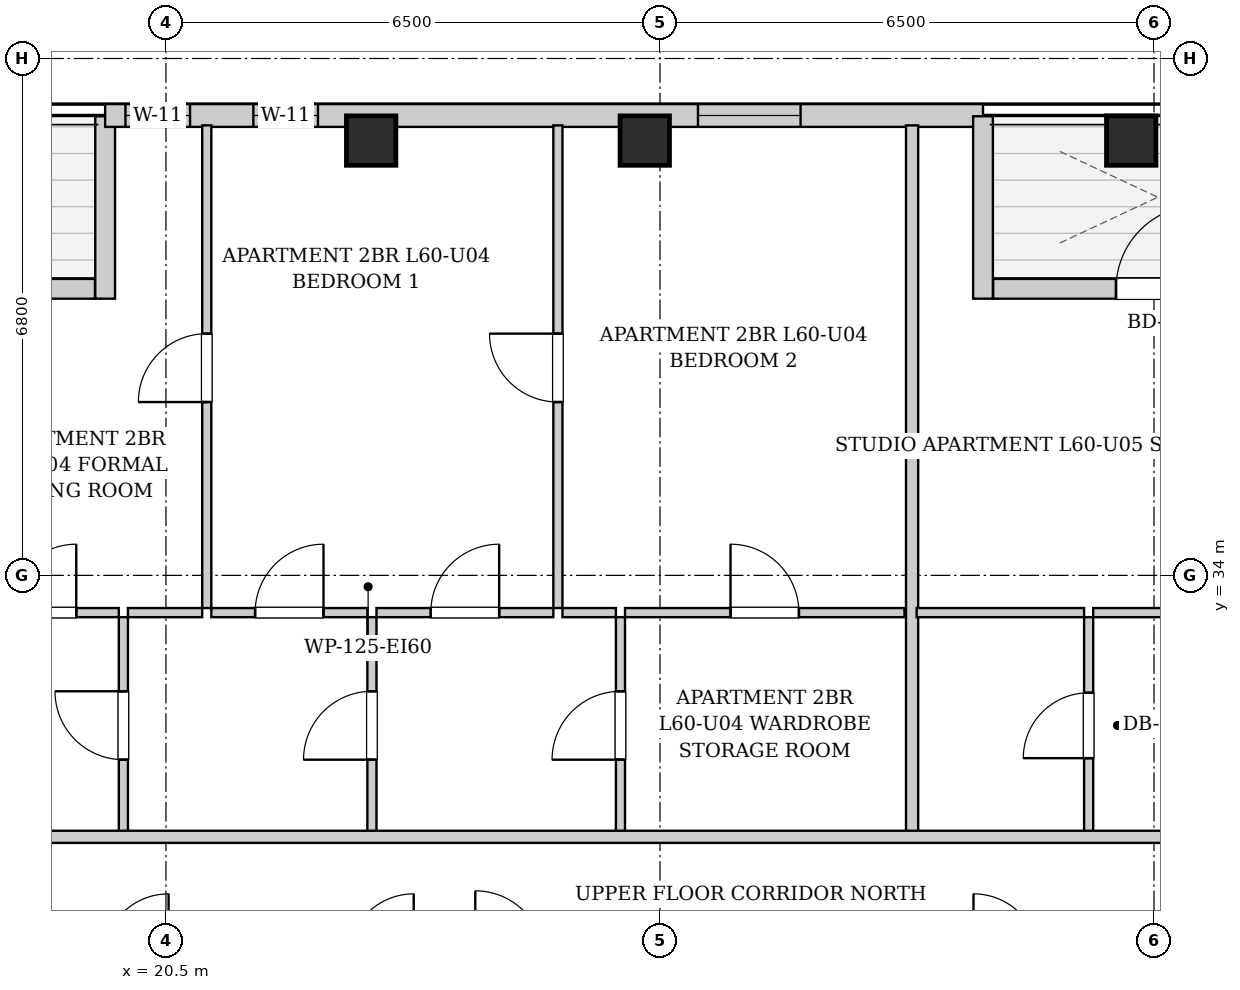
"""IFC4 building model, lengths in metres.
Left out: names, types, materials, properties, quantities, classifications, styles, units other than length and angle.
Written with IfcOpenShell. Run it as: python <this file> out.ifc"""

import sys

from ifc_helpers import new_model, si_unit, direction, frame, frame_2d, origin, origin_2d, place, context, subcontext, project, spatial, rectangle, extrude, element, fill, save


model = new_model("IFC4")
c1 = context("Model", 3, precision=1e-05, world=origin(), true_north=direction((0.0, 1.0)))
c2 = subcontext(c1, "Body", "Model", "MODEL_VIEW")
j1 = project(units=[si_unit("LENGTHUNIT", "METRE"), si_unit("PLANEANGLEUNIT", "RADIAN")], contexts=[c1])
p1 = place(None, origin())
s1 = spatial("IfcSite", under=j1, at=p1, CompositionType="ELEMENT")
p2 = place(p1, origin())
s2 = spatial("IfcBuilding", under=s1, at=p2, CompositionType="ELEMENT")
p3 = place(p2, frame((0.0, 0.0, 207.4)))
s3 = spatial("IfcBuildingStorey", under=s2, at=p3, CompositionType="ELEMENT", Elevation=207.4)
for number, where, z_axis, x_axis in (
    (1, (23.2, 39.72, 0.0), (0.0, 0.0, 1.0), (1.0, 0.0, 0.0)),
    (2, (26.8, 39.72, 0.0), (0.0, 0.0, 1.0), (1.0, 0.0, 0.0)),
    (3, (33.2, 39.72, 0.0), (0.0, 0.0, 1.0), (1.0, 0.0, 0.0)),
):
    element("IfcColumn", number, at=place(p3, frame(where, z_axis=z_axis, x_axis=x_axis)), inside=s3, PredefinedType="COLUMN", context=c2, shape_type="SweptSolid", body=[
        extrude(rectangle(XDim=0.65, YDim=0.65, at=origin_2d()), origin(), (0.0, 0.0, 1.0), 3.3),
    ])
p4 = place(p3, frame((14.534, 37.77, 0.0), z_axis=(0.0, 0.0, 1.0), x_axis=(1.0, 0.0, 0.0)))
e4 = element("IfcWall", 4, at=p4, inside=s3, PredefinedType="SOLIDWALL", context=c2, shape_type="SweptSolid", body=[
    extrude(rectangle(XDim=5.032, YDim=0.26, at=frame_2d((2.516, 0.0))), origin(), (0.0, 0.0, 1.0), 3.04),
])
p5 = place(p4, frame((1.966, 0.0, 0.0)))
e5 = element("IfcOpeningElement", 5, at=p5, cuts=e4, PredefinedType="OPENING", context=c2, shape_type="SweptSolid", body=[
    extrude(rectangle(XDim=1.1, YDim=2.0, at=frame_2d((0.55, 1.0))), frame((0.0, 0.14, 0.0), z_axis=(0.0, -1.0, 0.0), x_axis=(1.0, 0.0, 0.0)), (0.0, 0.0, 1.0), 0.28),
])
p6 = place(p3, frame((19.7, 37.64, 0.0), z_axis=(0.0, 0.0, 1.0), x_axis=(0.0, 1.0, 0.0)))
e6 = element("IfcWall", 6, at=p6, inside=s3, PredefinedType="SOLIDWALL", context=c2, shape_type="SweptSolid", body=[
    extrude(rectangle(XDim=2.4, YDim=0.26, at=frame_2d((1.2, 0.0))), origin(), (0.0, 0.0, 1.0), 3.04),
])
p7 = place(p3, frame((19.7, 40.05, 0.0), z_axis=(0.0, 0.0, 1.0), x_axis=(1.0, 0.0, 0.0)))
e7 = element("IfcWall", 7, at=p7, inside=s3, PredefinedType="SOLIDWALL", context=c2, shape_type="SweptSolid", body=[
    extrude(rectangle(XDim=11.55, YDim=0.3, at=frame_2d((5.775, 0.0))), origin(), (0.0, 0.0, 1.0), 3.04),
])
p8 = place(p7, frame((0.267, 0.0, 0.55)))
e8 = element("IfcOpeningElement", 8, at=p8, cuts=e7, PredefinedType="OPENING", context=c2, shape_type="SweptSolid", body=[
    extrude(rectangle(XDim=0.85, YDim=1.2, at=frame_2d((0.425, 0.6))), frame((0.0, 0.16, 0.0), z_axis=(0.0, -1.0, 0.0), x_axis=(1.0, 0.0, 0.0)), (0.0, 0.0, 1.0), 0.32),
])
p9 = place(p7, frame((1.95, 0.0, 0.55)))
e9 = element("IfcOpeningElement", 9, at=p9, cuts=e7, PredefinedType="OPENING", context=c2, shape_type="SweptSolid", body=[
    extrude(rectangle(XDim=0.85, YDim=1.2, at=frame_2d((0.425, 0.6))), frame((0.0, 0.16, 0.0), z_axis=(0.0, -1.0, 0.0), x_axis=(1.0, 0.0, 0.0)), (0.0, 0.0, 1.0), 0.32),
])
p10 = place(p7, frame((7.8, 0.0, 0.55)))
e10 = element("IfcOpeningElement", 10, at=p10, cuts=e7, PredefinedType="OPENING", context=c2, shape_type="SweptSolid", body=[
    extrude(rectangle(XDim=1.35, YDim=1.2, at=frame_2d((0.675, 0.6))), frame((0.0, 0.16, 0.0), z_axis=(0.0, -1.0, 0.0), x_axis=(1.0, 0.0, 0.0)), (0.0, 0.0, 1.0), 0.32),
])
p11 = place(p3, frame((31.25, 40.04, 0.0), z_axis=(0.0, 0.0, 1.0), x_axis=(0.0, -1.0, 0.0)))
e11 = element("IfcWall", 11, at=p11, inside=s3, PredefinedType="SOLIDWALL", context=c2, shape_type="SweptSolid", body=[
    extrude(rectangle(XDim=2.4, YDim=0.26, at=frame_2d((1.2, 0.0))), origin(), (0.0, 0.0, 1.0), 3.04),
])
p12 = place(p3, frame((31.384, 37.77, 0.0), z_axis=(0.0, 0.0, 1.0), x_axis=(1.0, 0.0, 0.0)))
e12 = element("IfcWall", 12, at=p12, inside=s3, PredefinedType="SOLIDWALL", context=c2, shape_type="SweptSolid", body=[
    extrude(rectangle(XDim=4.332, YDim=0.26, at=frame_2d((2.166, 0.0))), origin(), (0.0, 0.0, 1.0), 3.04),
])
p13 = place(p12, frame((1.616, 0.0, 0.0)))
e13 = element("IfcOpeningElement", 13, at=p13, cuts=e12, PredefinedType="OPENING", context=c2, shape_type="SweptSolid", body=[
    extrude(rectangle(XDim=1.1, YDim=2.0, at=frame_2d((0.55, 1.0))), frame((0.0, 0.14, 0.0), z_axis=(0.0, -1.0, 0.0), x_axis=(1.0, 0.0, 0.0)), (0.0, 0.0, 1.0), 0.28),
])
p14 = place(p3, frame((19.94, 30.6, 0.0), z_axis=(0.0, 0.0, 1.0), x_axis=(0.0, 1.0, 0.0)))
e14 = element("IfcWall", 14, at=p14, inside=s3, PredefinedType="PARTITIONING", context=c2, shape_type="SweptSolid", body=[
    extrude(rectangle(XDim=2.85, YDim=0.12, at=frame_2d((1.425, 0.0))), origin(), (0.0, 0.0, 1.0), 3.04),
])
p15 = place(p14, frame((0.975, 0.0, 0.0)))
e15 = element("IfcOpeningElement", 15, at=p15, cuts=e14, PredefinedType="OPENING", context=c2, shape_type="SweptSolid", body=[
    extrude(rectangle(XDim=0.9, YDim=2.05, at=frame_2d((0.45, 1.025))), frame((0.0, 0.07, 0.0), z_axis=(0.0, -1.0, 0.0), x_axis=(1.0, 0.0, 0.0)), (0.0, 0.0, 1.0), 0.14),
])
p16 = place(p3, frame((17.86, 33.51, 0.0), z_axis=(0.0, 0.0, 1.0), x_axis=(1.0, 0.0, 0.0)))
e16 = element("IfcWall", 16, at=p16, inside=s3, PredefinedType="PARTITIONING", context=c2, shape_type="SweptSolid", body=[
    extrude(rectangle(XDim=2.02, YDim=0.12, at=frame_2d((1.01, 0.0))), origin(), (0.0, 0.0, 1.0), 3.04),
])
p17 = place(p16, frame((0.56, 0.0, 0.0)))
e17 = element("IfcOpeningElement", 17, at=p17, cuts=e16, PredefinedType="OPENING", context=c2, shape_type="SweptSolid", body=[
    extrude(rectangle(XDim=0.9, YDim=2.05, at=frame_2d((0.45, 1.025))), frame((0.0, 0.07, 0.0), z_axis=(0.0, -1.0, 0.0), x_axis=(1.0, 0.0, 0.0)), (0.0, 0.0, 1.0), 0.14),
])
p18 = place(p3, frame((23.21, 30.6, 0.0), z_axis=(0.0, 0.0, 1.0), x_axis=(0.0, 1.0, 0.0)))
e18 = element("IfcWall", 18, at=p18, inside=s3, PredefinedType="PARTITIONING", context=c2, shape_type="SweptSolid", body=[
    extrude(rectangle(XDim=2.85, YDim=0.12, at=frame_2d((1.425, 0.0))), origin(), (0.0, 0.0, 1.0), 3.04),
])
p19 = place(p18, frame((0.975, 0.0, 0.0)))
e19 = element("IfcOpeningElement", 19, at=p19, cuts=e18, PredefinedType="OPENING", context=c2, shape_type="SweptSolid", body=[
    extrude(rectangle(XDim=0.9, YDim=2.05, at=frame_2d((0.45, 1.025))), frame((0.0, 0.07, 0.0), z_axis=(0.0, -1.0, 0.0), x_axis=(1.0, 0.0, 0.0)), (0.0, 0.0, 1.0), 0.14),
])
p20 = place(p3, frame((20.0, 33.51, 0.0), z_axis=(0.0, 0.0, 1.0), x_axis=(1.0, 0.0, 0.0)))
e20 = element("IfcWall", 20, at=p20, inside=s3, PredefinedType="PARTITIONING", context=c2, shape_type="SweptSolid", body=[
    extrude(rectangle(XDim=0.977, YDim=0.12, at=frame_2d((0.489, 0.0))), origin(), (0.0, 0.0, 1.0), 3.04),
])
p21 = place(p3, frame((21.097, 33.51, 0.0), z_axis=(0.0, 0.0, 1.0), x_axis=(1.0, 0.0, 0.0)))
e21 = element("IfcWall", 21, at=p21, inside=s3, PredefinedType="PARTITIONING", context=c2, shape_type="SweptSolid", body=[
    extrude(rectangle(XDim=2.053, YDim=0.12, at=frame_2d((1.026, 0.0))), origin(), (0.0, 0.0, 1.0), 3.04),
])
p22 = place(p21, frame((0.576, 0.0, 0.0)))
e22 = element("IfcOpeningElement", 22, at=p22, cuts=e21, PredefinedType="OPENING", context=c2, shape_type="SweptSolid", body=[
    extrude(rectangle(XDim=0.9, YDim=2.05, at=frame_2d((0.45, 1.025))), frame((0.0, 0.07, 0.0), z_axis=(0.0, -1.0, 0.0), x_axis=(1.0, 0.0, 0.0)), (0.0, 0.0, 1.0), 0.14),
])
p23 = place(p3, frame((26.48, 30.6, 0.0), z_axis=(0.0, 0.0, 1.0), x_axis=(0.0, 1.0, 0.0)))
e23 = element("IfcWall", 23, at=p23, inside=s3, PredefinedType="PARTITIONING", context=c2, shape_type="SweptSolid", body=[
    extrude(rectangle(XDim=2.85, YDim=0.12, at=frame_2d((1.425, 0.0))), origin(), (0.0, 0.0, 1.0), 3.04),
])
p24 = place(p23, frame((0.975, 0.0, 0.0)))
e24 = element("IfcOpeningElement", 24, at=p24, cuts=e23, PredefinedType="OPENING", context=c2, shape_type="SweptSolid", body=[
    extrude(rectangle(XDim=0.9, YDim=2.05, at=frame_2d((0.45, 1.025))), frame((0.0, 0.07, 0.0), z_axis=(0.0, -1.0, 0.0), x_axis=(1.0, 0.0, 0.0)), (0.0, 0.0, 1.0), 0.14),
])
p25 = place(p3, frame((23.27, 33.51, 0.0), z_axis=(0.0, 0.0, 1.0), x_axis=(1.0, 0.0, 0.0)))
e25 = element("IfcWall", 25, at=p25, inside=s3, PredefinedType="PARTITIONING", context=c2, shape_type="SweptSolid", body=[
    extrude(rectangle(XDim=2.327, YDim=0.12, at=frame_2d((1.164, 0.0))), origin(), (0.0, 0.0, 1.0), 3.04),
])
p26 = place(p25, frame((0.714, 0.0, 0.0)))
e26 = element("IfcOpeningElement", 26, at=p26, cuts=e25, PredefinedType="OPENING", context=c2, shape_type="SweptSolid", body=[
    extrude(rectangle(XDim=0.9, YDim=2.05, at=frame_2d((0.45, 1.025))), frame((0.0, 0.07, 0.0), z_axis=(0.0, -1.0, 0.0), x_axis=(1.0, 0.0, 0.0)), (0.0, 0.0, 1.0), 0.14),
])
p27 = place(p3, frame((25.717, 33.51, 0.0), z_axis=(0.0, 0.0, 1.0), x_axis=(1.0, 0.0, 0.0)))
e27 = element("IfcWall", 27, at=p27, inside=s3, PredefinedType="PARTITIONING", context=c2, shape_type="SweptSolid", body=[
    extrude(rectangle(XDim=0.703, YDim=0.12, at=frame_2d((0.352, 0.0))), origin(), (0.0, 0.0, 1.0), 3.04),
])
p28 = place(p3, frame((26.54, 33.51, 0.0), z_axis=(0.0, 0.0, 1.0), x_axis=(1.0, 0.0, 0.0)))
e28 = element("IfcWall", 28, at=p28, inside=s3, PredefinedType="PARTITIONING", context=c2, shape_type="SweptSolid", body=[
    extrude(rectangle(XDim=3.677, YDim=0.12, at=frame_2d((1.838, 0.0))), origin(), (0.0, 0.0, 1.0), 3.04),
])
p29 = place(p28, frame((1.388, 0.0, 0.0)))
e29 = element("IfcOpeningElement", 29, at=p29, cuts=e28, PredefinedType="OPENING", context=c2, shape_type="SweptSolid", body=[
    extrude(rectangle(XDim=0.9, YDim=2.05, at=frame_2d((0.45, 1.025))), frame((0.0, 0.07, 0.0), z_axis=(0.0, -1.0, 0.0), x_axis=(1.0, 0.0, 0.0)), (0.0, 0.0, 1.0), 0.14),
])
p30 = place(p3, frame((21.037, 33.57, 0.0), z_axis=(0.0, 0.0, 1.0), x_axis=(0.0, 1.0, 0.0)))
e30 = element("IfcWall", 30, at=p30, inside=s3, PredefinedType="PARTITIONING", context=c2, shape_type="SweptSolid", body=[
    extrude(rectangle(XDim=6.35, YDim=0.12, at=frame_2d((3.175, 0.0))), origin(), (0.0, 0.0, 1.0), 3.04),
])
p31 = place(p30, frame((2.71, 0.0, 0.0)))
e31 = element("IfcOpeningElement", 31, at=p31, cuts=e30, PredefinedType="OPENING", context=c2, shape_type="SweptSolid", body=[
    extrude(rectangle(XDim=0.9, YDim=2.05, at=frame_2d((0.45, 1.025))), frame((0.0, 0.07, 0.0), z_axis=(0.0, -1.0, 0.0), x_axis=(1.0, 0.0, 0.0)), (0.0, 0.0, 1.0), 0.14),
])
p32 = place(p3, frame((25.657, 33.57, 0.0), z_axis=(0.0, 0.0, 1.0), x_axis=(0.0, 1.0, 0.0)))
e32 = element("IfcWall", 32, at=p32, inside=s3, PredefinedType="PARTITIONING", context=c2, shape_type="SweptSolid", body=[
    extrude(rectangle(XDim=6.35, YDim=0.12, at=frame_2d((3.175, 0.0))), origin(), (0.0, 0.0, 1.0), 3.04),
])
p33 = place(p32, frame((2.71, 0.0, 0.0)))
e33 = element("IfcOpeningElement", 33, at=p33, cuts=e32, PredefinedType="OPENING", context=c2, shape_type="SweptSolid", body=[
    extrude(rectangle(XDim=0.9, YDim=2.05, at=frame_2d((0.45, 1.025))), frame((0.0, 0.07, 0.0), z_axis=(0.0, -1.0, 0.0), x_axis=(1.0, 0.0, 0.0)), (0.0, 0.0, 1.0), 0.14),
])
p34 = place(p3, frame((30.317, 30.6, 0.0), z_axis=(0.0, 0.0, 1.0), x_axis=(0.0, 1.0, 0.0)))
e34 = element("IfcWall", 34, at=p34, inside=s3, PredefinedType="PARTITIONING", context=c2, shape_type="SweptSolid", body=[
    extrude(rectangle(XDim=9.32, YDim=0.16, at=frame_2d((4.66, 0.0))), origin(), (0.0, 0.0, 1.0), 3.04),
])
p35 = place(p3, frame((32.64, 30.6, 0.0), z_axis=(0.0, 0.0, 1.0), x_axis=(0.0, 1.0, 0.0)))
e35 = element("IfcWall", 35, at=p35, inside=s3, PredefinedType="PARTITIONING", context=c2, shape_type="SweptSolid", body=[
    extrude(rectangle(XDim=2.85, YDim=0.12, at=frame_2d((1.425, 0.0))), origin(), (0.0, 0.0, 1.0), 3.04),
])
p36 = place(p35, frame((0.995, 0.0, 0.0)))
e36 = element("IfcOpeningElement", 36, at=p36, cuts=e35, PredefinedType="OPENING", context=c2, shape_type="SweptSolid", body=[
    extrude(rectangle(XDim=0.86, YDim=2.05, at=frame_2d((0.43, 1.025))), frame((0.0, 0.07, 0.0), z_axis=(0.0, -1.0, 0.0), x_axis=(1.0, 0.0, 0.0)), (0.0, 0.0, 1.0), 0.14),
])
p37 = place(p3, frame((30.377, 33.51, 0.0), z_axis=(0.0, 0.0, 1.0), x_axis=(1.0, 0.0, 0.0)))
e37 = element("IfcWall", 37, at=p37, inside=s3, PredefinedType="PARTITIONING", context=c2, shape_type="SweptSolid", body=[
    extrude(rectangle(XDim=2.203, YDim=0.12, at=frame_2d((1.102, 0.0))), origin(), (0.0, 0.0, 1.0), 3.04),
])
p38 = place(p3, frame((32.7, 33.51, 0.0), z_axis=(0.0, 0.0, 1.0), x_axis=(1.0, 0.0, 0.0)))
e38 = element("IfcWall", 38, at=p38, inside=s3, PredefinedType="PARTITIONING", context=c2, shape_type="SweptSolid", body=[
    extrude(rectangle(XDim=5.02, YDim=0.12, at=frame_2d((2.51, 0.0))), origin(), (0.0, 0.0, 1.0), 3.04),
])
p39 = place(p38, frame((2.06, 0.0, 0.0)))
e39 = element("IfcOpeningElement", 39, at=p39, cuts=e38, PredefinedType="OPENING", context=c2, shape_type="SweptSolid", body=[
    extrude(rectangle(XDim=0.9, YDim=2.05, at=frame_2d((0.45, 1.025))), frame((0.0, 0.07, 0.0), z_axis=(0.0, -1.0, 0.0), x_axis=(1.0, 0.0, 0.0)), (0.0, 0.0, 1.0), 0.14),
])
p40 = place(p3, frame((13.15, 30.56, 0.0), z_axis=(0.0, 0.0, 1.0), x_axis=(1.0, 0.0, 0.0)))
e40 = element("IfcWall", 40, at=p40, inside=s3, PredefinedType="PARTITIONING", context=c2, shape_type="SweptSolid", body=[
    extrude(rectangle(XDim=24.6, YDim=0.16, at=frame_2d((12.3, 0.0))), origin(), (0.0, 0.0, 1.0), 3.04),
])
p41 = place(p40, frame((3.115, 0.0, 0.0)))
e41 = element("IfcOpeningElement", 41, at=p41, cuts=e40, PredefinedType="OPENING", context=c2, shape_type="SweptSolid", body=[
    extrude(rectangle(XDim=0.95, YDim=2.1, at=frame_2d((0.475, 1.05))), frame((0.0, 0.09, 0.0), z_axis=(0.0, -1.0, 0.0), x_axis=(1.0, 0.0, 0.0)), (0.0, 0.0, 1.0), 0.18),
])
p42 = place(p40, frame((21.55, 0.0, 0.0)))
e42 = element("IfcOpeningElement", 42, at=p42, cuts=e40, PredefinedType="OPENING", context=c2, shape_type="SweptSolid", body=[
    extrude(rectangle(XDim=0.95, YDim=2.1, at=frame_2d((0.475, 1.05))), frame((0.0, 0.09, 0.0), z_axis=(0.0, -1.0, 0.0), x_axis=(1.0, 0.0, 0.0)), (0.0, 0.0, 1.0), 0.18),
])
p43 = place(p15, origin())
e43 = element("IfcDoor", 43, at=p43, inside=s3, OperationType="SINGLE_SWING_RIGHT", PredefinedType="DOOR", context=c2, shape_type="SweptSolid", body=[
    extrude(rectangle(XDim=0.9, YDim=2.05, at=frame_2d((0.45, 1.025))), frame((0.0, 0.025, 0.0), z_axis=(0.0, -1.0, 0.0), x_axis=(1.0, 0.0, 0.0)), (0.0, 0.0, 1.0), 0.05),
])
fill(e15, e43)
p44 = place(p17, origin())
e44 = element("IfcDoor", 44, at=p44, inside=s3, OperationType="SINGLE_SWING_RIGHT", PredefinedType="DOOR", context=c2, shape_type="SweptSolid", body=[
    extrude(rectangle(XDim=0.9, YDim=2.05, at=frame_2d((0.45, 1.025))), frame((0.0, 0.025, 0.0), z_axis=(0.0, -1.0, 0.0), x_axis=(1.0, 0.0, 0.0)), (0.0, 0.0, 1.0), 0.05),
])
fill(e17, e44)
p45 = place(p19, origin())
e45 = element("IfcDoor", 45, at=p45, inside=s3, OperationType="SINGLE_SWING_LEFT", PredefinedType="DOOR", context=c2, shape_type="SweptSolid", body=[
    extrude(rectangle(XDim=0.9, YDim=2.05, at=frame_2d((0.45, 1.025))), frame((0.0, 0.025, 0.0), z_axis=(0.0, -1.0, 0.0), x_axis=(1.0, 0.0, 0.0)), (0.0, 0.0, 1.0), 0.05),
])
fill(e19, e45)
p46 = place(p22, origin())
e46 = element("IfcDoor", 46, at=p46, inside=s3, OperationType="SINGLE_SWING_RIGHT", PredefinedType="DOOR", context=c2, shape_type="SweptSolid", body=[
    extrude(rectangle(XDim=0.9, YDim=2.05, at=frame_2d((0.45, 1.025))), frame((0.0, 0.025, 0.0), z_axis=(0.0, -1.0, 0.0), x_axis=(1.0, 0.0, 0.0)), (0.0, 0.0, 1.0), 0.05),
])
fill(e22, e46)
p47 = place(p24, origin())
e47 = element("IfcDoor", 47, at=p47, inside=s3, OperationType="SINGLE_SWING_LEFT", PredefinedType="DOOR", context=c2, shape_type="SweptSolid", body=[
    extrude(rectangle(XDim=0.9, YDim=2.05, at=frame_2d((0.45, 1.025))), frame((0.0, 0.025, 0.0), z_axis=(0.0, -1.0, 0.0), x_axis=(1.0, 0.0, 0.0)), (0.0, 0.0, 1.0), 0.05),
])
fill(e24, e47)
p48 = place(p26, origin())
e48 = element("IfcDoor", 48, at=p48, inside=s3, OperationType="SINGLE_SWING_RIGHT", PredefinedType="DOOR", context=c2, shape_type="SweptSolid", body=[
    extrude(rectangle(XDim=0.9, YDim=2.05, at=frame_2d((0.45, 1.025))), frame((0.0, 0.025, 0.0), z_axis=(0.0, -1.0, 0.0), x_axis=(1.0, 0.0, 0.0)), (0.0, 0.0, 1.0), 0.05),
])
fill(e26, e48)
p49 = place(p29, origin())
e49 = element("IfcDoor", 49, at=p49, inside=s3, OperationType="SINGLE_SWING_LEFT", PredefinedType="DOOR", context=c2, shape_type="SweptSolid", body=[
    extrude(rectangle(XDim=0.9, YDim=2.05, at=frame_2d((0.45, 1.025))), frame((0.0, 0.025, 0.0), z_axis=(0.0, -1.0, 0.0), x_axis=(1.0, 0.0, 0.0)), (0.0, 0.0, 1.0), 0.05),
])
fill(e29, e49)
p50 = place(p31, origin())
e50 = element("IfcDoor", 50, at=p50, inside=s3, OperationType="SINGLE_SWING_LEFT", PredefinedType="DOOR", context=c2, shape_type="SweptSolid", body=[
    extrude(rectangle(XDim=0.9, YDim=2.05, at=frame_2d((0.45, 1.025))), frame((0.0, 0.025, 0.0), z_axis=(0.0, -1.0, 0.0), x_axis=(1.0, 0.0, 0.0)), (0.0, 0.0, 1.0), 0.05),
])
fill(e31, e50)
p51 = place(p33, origin())
e51 = element("IfcDoor", 51, at=p51, inside=s3, OperationType="SINGLE_SWING_RIGHT", PredefinedType="DOOR", context=c2, shape_type="SweptSolid", body=[
    extrude(rectangle(XDim=0.9, YDim=2.05, at=frame_2d((0.45, 1.025))), frame((0.0, 0.025, 0.0), z_axis=(0.0, -1.0, 0.0), x_axis=(1.0, 0.0, 0.0)), (0.0, 0.0, 1.0), 0.05),
])
fill(e33, e51)
p52 = place(p36, origin())
e52 = element("IfcDoor", 52, at=p52, inside=s3, OperationType="SINGLE_SWING_LEFT", PredefinedType="DOOR", context=c2, shape_type="SweptSolid", body=[
    extrude(rectangle(XDim=0.86, YDim=2.05, at=frame_2d((0.43, 1.025))), frame((0.0, 0.025, 0.0), z_axis=(0.0, -1.0, 0.0), x_axis=(1.0, 0.0, 0.0)), (0.0, 0.0, 1.0), 0.05),
])
fill(e36, e52)
p53 = place(p13, origin())
e53 = element("IfcDoor", 53, at=p53, inside=s3, OperationType="SINGLE_SWING_RIGHT", PredefinedType="DOOR", context=c2, shape_type="SweptSolid", body=[
    extrude(rectangle(XDim=1.1, YDim=2.0, at=frame_2d((0.55, 1.0))), frame((0.0, 0.025, 0.0), z_axis=(0.0, -1.0, 0.0), x_axis=(1.0, 0.0, 0.0)), (0.0, 0.0, 1.0), 0.05),
])
fill(e13, e53)
p54 = place(p8, origin())
e54 = element("IfcWindow", 54, at=p54, inside=s3, PartitioningType="SINGLE_PANEL", PredefinedType="WINDOW", context=c2, shape_type="SweptSolid", body=[
    extrude(rectangle(XDim=0.85, YDim=1.2, at=frame_2d((0.425, 0.6))), frame((0.0, 0.03, 0.0), z_axis=(0.0, -1.0, 0.0), x_axis=(1.0, 0.0, 0.0)), (0.0, 0.0, 1.0), 0.06),
])
fill(e8, e54)
p55 = place(p9, origin())
e55 = element("IfcWindow", 55, at=p55, inside=s3, PartitioningType="SINGLE_PANEL", PredefinedType="WINDOW", context=c2, shape_type="SweptSolid", body=[
    extrude(rectangle(XDim=0.85, YDim=1.2, at=frame_2d((0.425, 0.6))), frame((0.0, 0.03, 0.0), z_axis=(0.0, -1.0, 0.0), x_axis=(1.0, 0.0, 0.0)), (0.0, 0.0, 1.0), 0.06),
])
fill(e9, e55)
p56 = place(p10, origin())
e56 = element("IfcWindow", 56, at=p56, inside=s3, PartitioningType="SINGLE_PANEL", PredefinedType="WINDOW", context=c2, shape_type="SweptSolid", body=[
    extrude(rectangle(XDim=1.35, YDim=1.2, at=frame_2d((0.675, 0.6))), frame((0.0, 0.03, 0.0), z_axis=(0.0, -1.0, 0.0), x_axis=(1.0, 0.0, 0.0)), (0.0, 0.0, 1.0), 0.06),
])
fill(e10, e56)
save(model, sys.argv[1])
